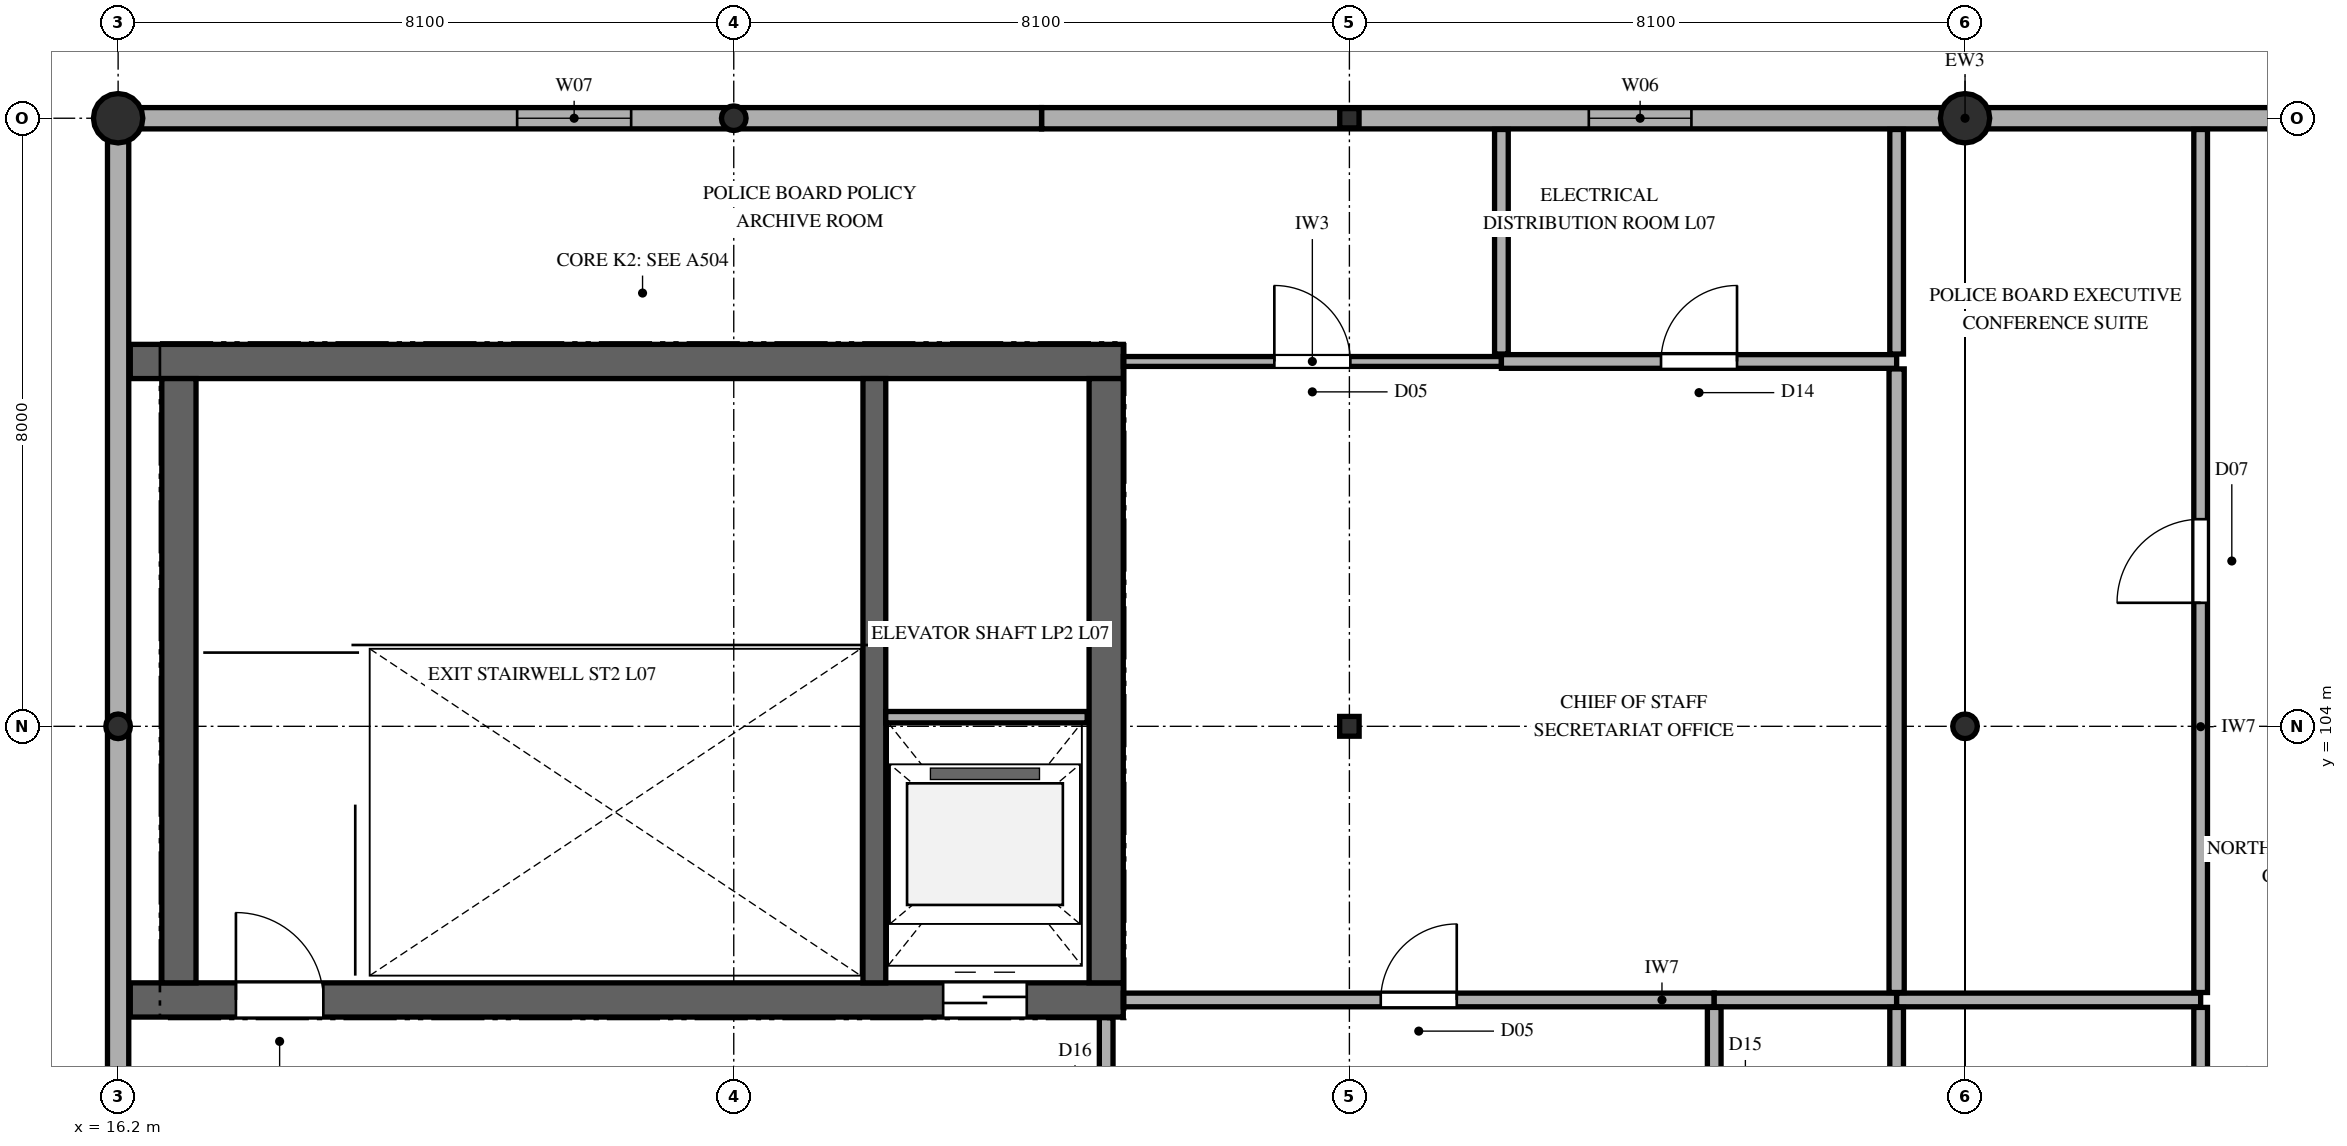
"""IFC4 building model, lengths in metres.
Left out: names, types, materials, properties, quantities, classifications, styles, units other than length and angle.
Written with IfcOpenShell. Run it as: python <this file> out.ifc"""

import sys

from ifc_helpers import new_model, si_unit, direction, frame, frame_2d, origin, origin_2d, place, context, subcontext, project, spatial, rectangle, hollow_rectangle, circle, hollow_circle, i_section, extrude, element, fill, save


model = new_model("IFC4")
c1 = context("Model", 3, precision=1e-05, world=origin(), true_north=direction((0.0, 1.0)))
c2 = subcontext(c1, "Body", "Model", "MODEL_VIEW")
j1 = project(units=[si_unit("LENGTHUNIT", "METRE"), si_unit("PLANEANGLEUNIT", "RADIAN")], contexts=[c1])
p1 = place(None, origin())
s1 = spatial("IfcSite", under=j1, at=p1, CompositionType="ELEMENT")
p2 = place(p1, origin())
s2 = spatial("IfcBuilding", under=s1, at=p2, CompositionType="ELEMENT")
p3 = place(p2, frame((0.0, 0.0, 33.3)))
s3 = spatial("IfcBuildingStorey", under=s2, at=p3, CompositionType="ELEMENT", Elevation=33.3)
p4 = place(p3, frame((16.36, 100.4, 0.0), z_axis=(0.0, 0.0, 1.0), x_axis=(1.0, 0.0, 0.0)))
e1 = element("IfcWall", 1, at=p4, inside=s3, PredefinedType="SHEAR", context=c2, shape_type="SweptSolid", body=[
    extrude(rectangle(XDim=13.065, YDim=0.45, at=frame_2d((6.532, 0.0))), origin(), (0.0, 0.0, 1.0), 3.98),
])
p5 = place(p4, frame((1.39, 0.0, 0.0)))
e2 = element("IfcOpeningElement", 2, at=p5, cuts=e1, PredefinedType="OPENING", context=c2, shape_type="SweptSolid", body=[
    extrude(rectangle(XDim=1.15, YDim=2.25, at=frame_2d((0.575, 1.125))), frame((0.0, 0.235, 0.0), z_axis=(0.0, -1.0, 0.0), x_axis=(1.0, 0.0, 0.0)), (0.0, 0.0, 1.0), 0.47),
])
p6 = place(p4, frame((10.695, 0.0, 0.0)))
e3 = element("IfcOpeningElement", 3, at=p6, cuts=e1, PredefinedType="OPENING", context=c2, shape_type="SweptSolid", body=[
    extrude(rectangle(XDim=1.1, YDim=2.2, at=frame_2d((0.55, 1.1))), frame((0.0, 0.235, 0.0), z_axis=(0.0, -1.0, 0.0), x_axis=(1.0, 0.0, 0.0)), (0.0, 0.0, 1.0), 0.47),
])
p7 = place(p3, frame((16.36, 108.8, 0.0), z_axis=(0.0, 0.0, 1.0), x_axis=(1.0, 0.0, 0.0)))
e4 = element("IfcWall", 4, at=p7, inside=s3, PredefinedType="SHEAR", context=c2, shape_type="SweptSolid", body=[
    extrude(rectangle(XDim=13.065, YDim=0.45, at=frame_2d((6.532, 0.0))), origin(), (0.0, 0.0, 1.0), 3.98),
])
for number, where, z_axis, x_axis in (
    (5, (17.0, 100.625, 0.0), (0.0, 0.0, 1.0), (0.0, 1.0, 0.0)),
    (6, (29.2, 100.625, 0.0), (0.0, 0.0, 1.0), (0.0, 1.0, 0.0)),
):
    element("IfcWall", number, at=place(p3, frame(where, z_axis=z_axis, x_axis=x_axis)), inside=s3, PredefinedType="SHEAR", context=c2, shape_type="SweptSolid", body=[
        extrude(rectangle(XDim=7.95, YDim=0.45, at=frame_2d((3.975, 0.0))), origin(), (0.0, 0.0, 1.0), 3.98),
    ])
p8 = place(p3, frame((26.15, 100.625, 0.0), z_axis=(0.0, 0.0, 1.0), x_axis=(0.0, 1.0, 0.0)))
e7 = element("IfcWall", 7, at=p8, inside=s3, PredefinedType="SHEAR", context=c2, shape_type="SweptSolid", body=[
    extrude(rectangle(XDim=7.95, YDim=0.3, at=frame_2d((3.975, 0.0))), origin(), (0.0, 0.0, 1.0), 3.98),
])
p9 = place(p3, frame((16.2, 104.0, 0.0), z_axis=(0.0, 0.0, 1.0), x_axis=(1.0, 0.0, 0.0)))
e8 = element("IfcColumn", 8, at=p9, inside=s3, PredefinedType="COLUMN", context=c2, shape_type="SweptSolid", body=[
    extrude(hollow_circle(Radius=0.162, WallThickness=0.013, at=origin_2d()), origin(), (0.0, 0.0, 1.0), 3.98),
])
p10 = place(p3, frame((16.2, 112.0, 0.0), z_axis=(0.0, 0.0, 1.0), x_axis=(1.0, 0.0, 0.0)))
e9 = element("IfcColumn", 9, at=p10, inside=s3, PredefinedType="COLUMN", context=c2, shape_type="SweptSolid", body=[
    extrude(circle(Radius=0.325, at=origin_2d()), origin(), (0.0, 0.0, 1.0), 3.98),
])
p11 = place(p3, frame((24.3, 112.0, 0.0), z_axis=(0.0, 0.0, 1.0), x_axis=(1.0, 0.0, 0.0)))
e10 = element("IfcColumn", 10, at=p11, inside=s3, PredefinedType="COLUMN", context=c2, shape_type="SweptSolid", body=[
    extrude(hollow_circle(Radius=0.162, WallThickness=0.013, at=origin_2d()), origin(), (0.0, 0.0, 1.0), 3.98),
])
p12 = place(p3, frame((32.4, 104.0, 0.0), z_axis=(0.0, 0.0, 1.0), x_axis=(1.0, 0.0, 0.0)))
e11 = element("IfcColumn", 11, at=p12, inside=s3, PredefinedType="COLUMN", context=c2, shape_type="SweptSolid", body=[
    extrude(i_section(OverallWidth=0.256, OverallDepth=0.26, WebThickness=0.011, FlangeThickness=0.017, FilletRadius=0.013, at=origin_2d()), origin(), (0.0, 0.0, 1.0), 3.98),
])
p13 = place(p3, frame((32.4, 112.0, 0.0), z_axis=(0.0, 0.0, 1.0), x_axis=(1.0, 0.0, 0.0)))
e12 = element("IfcColumn", 12, at=p13, inside=s3, PredefinedType="COLUMN", context=c2, shape_type="SweptSolid", body=[
    extrude(hollow_rectangle(XDim=0.254, YDim=0.254, WallThickness=0.013, InnerFilletRadius=0.013, OuterFilletRadius=0.025, at=origin_2d()), origin(), (0.0, 0.0, 1.0), 3.98),
])
p14 = place(p3, frame((40.5, 104.0, 0.0), z_axis=(0.0, 0.0, 1.0), x_axis=(1.0, 0.0, 0.0)))
e13 = element("IfcColumn", 13, at=p14, inside=s3, PredefinedType="COLUMN", context=c2, shape_type="SweptSolid", body=[
    extrude(hollow_circle(Radius=0.162, WallThickness=0.013, at=origin_2d()), origin(), (0.0, 0.0, 1.0), 3.98),
])
p15 = place(p3, frame((40.5, 112.0, 0.0), z_axis=(0.0, 0.0, 1.0), x_axis=(1.0, 0.0, 0.0)))
e14 = element("IfcColumn", 14, at=p15, inside=s3, PredefinedType="COLUMN", context=c2, shape_type="SweptSolid", body=[
    extrude(circle(Radius=0.325, at=origin_2d()), origin(), (0.0, 0.0, 1.0), 3.98),
])
p16 = place(p3, frame((52.65, 112.0, 0.0), z_axis=(0.0, 0.0, 1.0), x_axis=(-1.0, 0.0, 0.0)))
e15 = element("IfcWall", 15, at=p16, inside=s3, PredefinedType="SOLIDWALL", context=c2, shape_type="SweptSolid", body=[
    extrude(rectangle(XDim=12.15, YDim=0.28, at=frame_2d((6.075, 0.0))), origin(), (0.0, 0.0, 1.0), 3.655),
])
p17 = place(p3, frame((40.5, 112.0, 0.0), z_axis=(0.0, 0.0, 1.0), x_axis=(-1.0, 0.0, 0.0)))
e16 = element("IfcWall", 16, at=p17, inside=s3, PredefinedType="SOLIDWALL", context=c2, shape_type="SweptSolid", body=[
    extrude(rectangle(XDim=12.15, YDim=0.28, at=frame_2d((6.075, 0.0))), origin(), (0.0, 0.0, 1.0), 3.655),
])
p18 = place(p17, frame((3.6, 0.0, 0.85)))
e17 = element("IfcOpeningElement", 17, at=p18, cuts=e16, PredefinedType="OPENING", context=c2, shape_type="SweptSolid", body=[
    extrude(rectangle(XDim=1.35, YDim=2.1, at=frame_2d((0.675, 1.05))), frame((0.0, 0.15, 0.0), z_axis=(0.0, -1.0, 0.0), x_axis=(1.0, 0.0, 0.0)), (0.0, 0.0, 1.0), 0.3),
])
p19 = place(p3, frame((28.35, 112.0, 0.0), z_axis=(0.0, 0.0, 1.0), x_axis=(-1.0, 0.0, 0.0)))
e18 = element("IfcWall", 18, at=p19, inside=s3, PredefinedType="SOLIDWALL", context=c2, shape_type="SweptSolid", body=[
    extrude(rectangle(XDim=12.15, YDim=0.28, at=frame_2d((6.075, 0.0))), origin(), (0.0, 0.0, 1.0), 3.655),
])
p20 = place(p19, frame((5.4, 0.0, 0.95)))
e19 = element("IfcOpeningElement", 19, at=p20, cuts=e18, PredefinedType="OPENING", context=c2, shape_type="SweptSolid", body=[
    extrude(rectangle(XDim=1.5, YDim=1.8, at=frame_2d((0.75, 0.9))), frame((0.0, 0.15, 0.0), z_axis=(0.0, -1.0, 0.0), x_axis=(1.0, 0.0, 0.0)), (0.0, 0.0, 1.0), 0.3),
])
p21 = place(p3, frame((16.2, 112.0, 0.0), z_axis=(0.0, 0.0, 1.0), x_axis=(0.0, -1.0, 0.0)))
e20 = element("IfcWall", 20, at=p21, inside=s3, PredefinedType="SOLIDWALL", context=c2, shape_type="SweptSolid", body=[
    extrude(rectangle(XDim=14.0, YDim=0.28, at=frame_2d((7.0, 0.0))), origin(), (0.0, 0.0, 1.0), 3.655),
])
p22 = place(p3, frame((26.3, 104.12, 0.0), z_axis=(0.0, 0.0, 1.0), x_axis=(1.0, 0.0, 0.0)))
e21 = element("IfcWall", 21, at=p22, inside=s3, PredefinedType="PARTITIONING", context=c2, shape_type="SweptSolid", body=[
    extrude(rectangle(XDim=2.65, YDim=0.15, at=frame_2d((1.325, 0.0))), origin(), (0.0, 0.0, 1.0), 3.98),
])
p23 = place(p3, frame((29.425, 100.4, 0.0), z_axis=(0.0, 0.0, 1.0), x_axis=(1.0, 0.0, 0.0)))
e22 = element("IfcWall", 22, at=p23, inside=s3, PredefinedType="PARTITIONING", context=c2, shape_type="SweptSolid", body=[
    extrude(rectangle(XDim=7.775, YDim=0.18, at=frame_2d((3.887, 0.0))), origin(), (0.0, 0.0, 1.0), 3.98),
])
p24 = place(p23, frame((3.387, 0.0, 0.0)))
e23 = element("IfcOpeningElement", 23, at=p24, cuts=e22, PredefinedType="OPENING", context=c2, shape_type="SweptSolid", body=[
    extrude(rectangle(XDim=1.0, YDim=2.2, at=frame_2d((0.5, 1.1))), frame((0.0, 0.1, 0.0), z_axis=(0.0, -1.0, 0.0), x_axis=(1.0, 0.0, 0.0)), (0.0, 0.0, 1.0), 0.2),
])
p25 = place(p3, frame((29.425, 108.8, 0.0), z_axis=(0.0, 0.0, 1.0), x_axis=(1.0, 0.0, 0.0)))
e24 = element("IfcWall", 24, at=p25, inside=s3, PredefinedType="PARTITIONING", context=c2, shape_type="SweptSolid", body=[
    extrude(rectangle(XDim=4.975, YDim=0.13, at=frame_2d((2.487, 0.0))), origin(), (0.0, 0.0, 1.0), 3.98),
])
p26 = place(p25, frame((1.988, 0.0, 0.0)))
e25 = element("IfcOpeningElement", 25, at=p26, cuts=e24, PredefinedType="OPENING", context=c2, shape_type="SweptSolid", body=[
    extrude(rectangle(XDim=1.0, YDim=2.2, at=frame_2d((0.5, 1.1))), frame((0.0, 0.075, 0.0), z_axis=(0.0, -1.0, 0.0), x_axis=(1.0, 0.0, 0.0)), (0.0, 0.0, 1.0), 0.15),
])
p27 = place(p3, frame((34.4, 108.8, 0.0), z_axis=(0.0, 0.0, 1.0), x_axis=(1.0, 0.0, 0.0)))
e26 = element("IfcWall", 26, at=p27, inside=s3, PredefinedType="PARTITIONING", context=c2, shape_type="SweptSolid", body=[
    extrude(rectangle(XDim=5.2, YDim=0.18, at=frame_2d((2.6, 0.0))), origin(), (0.0, 0.0, 1.0), 3.98),
])
p28 = place(p27, frame((2.1, 0.0, 0.0)))
e27 = element("IfcOpeningElement", 27, at=p28, cuts=e26, PredefinedType="OPENING", context=c2, shape_type="SweptSolid", body=[
    extrude(rectangle(XDim=1.0, YDim=2.15, at=frame_2d((0.5, 1.075))), frame((0.0, 0.1, 0.0), z_axis=(0.0, -1.0, 0.0), x_axis=(1.0, 0.0, 0.0)), (0.0, 0.0, 1.0), 0.2),
])
p29 = place(p3, frame((37.2, 100.4, 0.0), z_axis=(0.0, 0.0, 1.0), x_axis=(1.0, 0.0, 0.0)))
e28 = element("IfcWall", 28, at=p29, inside=s3, PredefinedType="PARTITIONING", context=c2, shape_type="SweptSolid", body=[
    extrude(rectangle(XDim=2.4, YDim=0.18, at=frame_2d((1.2, 0.0))), origin(), (0.0, 0.0, 1.0), 3.98),
])
p30 = place(p3, frame((39.6, 100.4, 0.0), z_axis=(0.0, 0.0, 1.0), x_axis=(1.0, 0.0, 0.0)))
e29 = element("IfcWall", 29, at=p30, inside=s3, PredefinedType="PARTITIONING", context=c2, shape_type="SweptSolid", body=[
    extrude(rectangle(XDim=4.0, YDim=0.18, at=frame_2d((2.0, 0.0))), origin(), (0.0, 0.0, 1.0), 3.98),
])
p31 = place(p3, frame((29.2, 96.898, 0.0), z_axis=(0.0, 0.0, 1.0), x_axis=(0.0, 1.0, 0.0)))
e30 = element("IfcWall", 30, at=p31, inside=s3, PredefinedType="PARTITIONING", context=c2, shape_type="SweptSolid", body=[
    extrude(rectangle(XDim=3.269, YDim=0.18, at=frame_2d((1.635, 0.0))), origin(), (0.0, 0.0, 1.0), 3.98),
])
p32 = place(p31, frame((1.034, 0.0, 0.0)))
e31 = element("IfcOpeningElement", 31, at=p32, cuts=e30, PredefinedType="OPENING", context=c2, shape_type="SweptSolid", body=[
    extrude(rectangle(XDim=1.2, YDim=2.2, at=frame_2d((0.6, 1.1))), frame((0.0, 0.1, 0.0), z_axis=(0.0, -1.0, 0.0), x_axis=(1.0, 0.0, 0.0)), (0.0, 0.0, 1.0), 0.2),
])
p33 = place(p3, frame((34.4, 108.898, 0.0), z_axis=(0.0, 0.0, 1.0), x_axis=(0.0, 1.0, 0.0)))
e32 = element("IfcWall", 32, at=p33, inside=s3, PredefinedType="PARTITIONING", context=c2, shape_type="SweptSolid", body=[
    extrude(rectangle(XDim=2.954, YDim=0.18, at=frame_2d((1.477, 0.0))), origin(), (0.0, 0.0, 1.0), 3.98),
])
p34 = place(p3, frame((37.2, 96.898, 0.0), z_axis=(0.0, 0.0, 1.0), x_axis=(0.0, 1.0, 0.0)))
e33 = element("IfcWall", 33, at=p34, inside=s3, PredefinedType="PARTITIONING", context=c2, shape_type="SweptSolid", body=[
    extrude(rectangle(XDim=3.404, YDim=0.18, at=frame_2d((1.702, 0.0))), origin(), (0.0, 0.0, 1.0), 3.98),
])
p35 = place(p34, frame((1.152, 0.0, 0.0)))
e34 = element("IfcOpeningElement", 34, at=p35, cuts=e33, PredefinedType="OPENING", context=c2, shape_type="SweptSolid", body=[
    extrude(rectangle(XDim=1.1, YDim=2.2, at=frame_2d((0.55, 1.1))), frame((0.0, 0.1, 0.0), z_axis=(0.0, -1.0, 0.0), x_axis=(1.0, 0.0, 0.0)), (0.0, 0.0, 1.0), 0.2),
])
p36 = place(p3, frame((39.6, 96.098, 0.0), z_axis=(0.0, 0.0, 1.0), x_axis=(0.0, 1.0, 0.0)))
e35 = element("IfcWall", 35, at=p36, inside=s3, PredefinedType="PARTITIONING", context=c2, shape_type="SweptSolid", body=[
    extrude(rectangle(XDim=4.204, YDim=0.18, at=frame_2d((2.102, 0.0))), origin(), (0.0, 0.0, 1.0), 3.98),
])
p37 = place(p36, frame((1.552, 0.0, 0.0)))
e36 = element("IfcOpeningElement", 36, at=p37, cuts=e35, PredefinedType="OPENING", context=c2, shape_type="SweptSolid", body=[
    extrude(rectangle(XDim=1.1, YDim=2.2, at=frame_2d((0.55, 1.1))), frame((0.0, 0.1, 0.0), z_axis=(0.0, -1.0, 0.0), x_axis=(1.0, 0.0, 0.0)), (0.0, 0.0, 1.0), 0.2),
])
p38 = place(p3, frame((39.6, 100.498, 0.0), z_axis=(0.0, 0.0, 1.0), x_axis=(0.0, 1.0, 0.0)))
e37 = element("IfcWall", 37, at=p38, inside=s3, PredefinedType="PARTITIONING", context=c2, shape_type="SweptSolid", body=[
    extrude(rectangle(XDim=8.204, YDim=0.2, at=frame_2d((4.102, 0.0))), origin(), (0.0, 0.0, 1.0), 3.98),
])
p39 = place(p3, frame((39.6, 108.898, 0.0), z_axis=(0.0, 0.0, 1.0), x_axis=(0.0, 1.0, 0.0)))
e38 = element("IfcWall", 38, at=p39, inside=s3, PredefinedType="PARTITIONING", context=c2, shape_type="SweptSolid", body=[
    extrude(rectangle(XDim=2.954, YDim=0.18, at=frame_2d((1.477, 0.0))), origin(), (0.0, 0.0, 1.0), 3.98),
])
p40 = place(p3, frame((43.6, 96.138, 0.0), z_axis=(0.0, 0.0, 1.0), x_axis=(0.0, 1.0, 0.0)))
e39 = element("IfcWall", 39, at=p40, inside=s3, PredefinedType="PARTITIONING", context=c2, shape_type="SweptSolid", body=[
    extrude(rectangle(XDim=4.164, YDim=0.18, at=frame_2d((2.082, 0.0))), origin(), (0.0, 0.0, 1.0), 3.98),
])
p41 = place(p40, frame((1.532, 0.0, 0.0)))
e40 = element("IfcOpeningElement", 40, at=p41, cuts=e39, PredefinedType="OPENING", context=c2, shape_type="SweptSolid", body=[
    extrude(rectangle(XDim=1.1, YDim=2.2, at=frame_2d((0.55, 1.1))), frame((0.0, 0.1, 0.0), z_axis=(0.0, -1.0, 0.0), x_axis=(1.0, 0.0, 0.0)), (0.0, 0.0, 1.0), 0.2),
])
p42 = place(p3, frame((43.6, 100.498, 0.0), z_axis=(0.0, 0.0, 1.0), x_axis=(0.0, 1.0, 0.0)))
e41 = element("IfcWall", 41, at=p42, inside=s3, PredefinedType="PARTITIONING", context=c2, shape_type="SweptSolid", body=[
    extrude(rectangle(XDim=11.354, YDim=0.18, at=frame_2d((5.677, 0.0))), origin(), (0.0, 0.0, 1.0), 3.98),
])
p43 = place(p42, frame((5.127, 0.0, 0.0)))
e42 = element("IfcOpeningElement", 42, at=p43, cuts=e41, PredefinedType="OPENING", context=c2, shape_type="SweptSolid", body=[
    extrude(rectangle(XDim=1.1, YDim=2.2, at=frame_2d((0.55, 1.1))), frame((0.0, 0.1, 0.0), z_axis=(0.0, -1.0, 0.0), x_axis=(1.0, 0.0, 0.0)), (0.0, 0.0, 1.0), 0.2),
])
p44 = place(p18, origin())
e43 = element("IfcWindow", 43, at=p44, inside=s3, PartitioningType="DOUBLE_PANEL_VERTICAL", PredefinedType="WINDOW", context=c2, shape_type="SweptSolid", body=[
    extrude(rectangle(XDim=1.35, YDim=2.1, at=frame_2d((0.675, 1.05))), frame((0.0, 0.03, 0.0), z_axis=(0.0, -1.0, 0.0), x_axis=(1.0, 0.0, 0.0)), (0.0, 0.0, 1.0), 0.06),
])
fill(e17, e43)
p45 = place(p20, origin())
e44 = element("IfcWindow", 44, at=p45, inside=s3, PartitioningType="DOUBLE_PANEL_VERTICAL", PredefinedType="WINDOW", context=c2, shape_type="SweptSolid", body=[
    extrude(rectangle(XDim=1.5, YDim=1.8, at=frame_2d((0.75, 0.9))), frame((0.0, 0.03, 0.0), z_axis=(0.0, -1.0, 0.0), x_axis=(1.0, 0.0, 0.0)), (0.0, 0.0, 1.0), 0.06),
])
fill(e19, e44)
p46 = place(p5, origin())
e45 = element("IfcDoor", 45, at=p46, inside=s3, OperationType="SINGLE_SWING_LEFT", PredefinedType="DOOR", context=c2, shape_type="SweptSolid", body=[
    extrude(rectangle(XDim=1.15, YDim=2.25, at=frame_2d((0.575, 1.125))), frame((0.0, 0.025, 0.0), z_axis=(0.0, -1.0, 0.0), x_axis=(1.0, 0.0, 0.0)), (0.0, 0.0, 1.0), 0.05),
])
fill(e2, e45)
p47 = place(p6, frame((1.1, 0.0, 0.0), z_axis=(0.0, 0.0, 1.0), x_axis=(-1.0, 0.0, 0.0)))
e46 = element("IfcDoor", 46, at=p47, inside=s3, OperationType="DOUBLE_DOOR_SLIDING", PredefinedType="DOOR", context=c2, shape_type="SweptSolid", body=[
    extrude(rectangle(XDim=1.1, YDim=2.2, at=frame_2d((0.55, 1.1))), frame((0.0, 0.025, 0.0), z_axis=(0.0, -1.0, 0.0), x_axis=(1.0, 0.0, 0.0)), (0.0, 0.0, 1.0), 0.05),
])
fill(e3, e46)
p48 = place(p24, origin())
e47 = element("IfcDoor", 47, at=p48, inside=s3, OperationType="SINGLE_SWING_RIGHT", PredefinedType="DOOR", context=c2, shape_type="SweptSolid", body=[
    extrude(rectangle(XDim=1.0, YDim=2.2, at=frame_2d((0.5, 1.1))), frame((0.0, 0.025, 0.0), z_axis=(0.0, -1.0, 0.0), x_axis=(1.0, 0.0, 0.0)), (0.0, 0.0, 1.0), 0.05),
])
fill(e23, e47)
p49 = place(p26, origin())
e48 = element("IfcDoor", 48, at=p49, inside=s3, OperationType="SINGLE_SWING_LEFT", PredefinedType="DOOR", context=c2, shape_type="SweptSolid", body=[
    extrude(rectangle(XDim=1.0, YDim=2.2, at=frame_2d((0.5, 1.1))), frame((0.0, 0.025, 0.0), z_axis=(0.0, -1.0, 0.0), x_axis=(1.0, 0.0, 0.0)), (0.0, 0.0, 1.0), 0.05),
])
fill(e25, e48)
p50 = place(p28, origin())
e49 = element("IfcDoor", 49, at=p50, inside=s3, OperationType="SINGLE_SWING_RIGHT", PredefinedType="DOOR", context=c2, shape_type="SweptSolid", body=[
    extrude(rectangle(XDim=1.0, YDim=2.15, at=frame_2d((0.5, 1.075))), frame((0.0, 0.025, 0.0), z_axis=(0.0, -1.0, 0.0), x_axis=(1.0, 0.0, 0.0)), (0.0, 0.0, 1.0), 0.05),
])
fill(e27, e49)
p51 = place(p43, origin())
e50 = element("IfcDoor", 50, at=p51, inside=s3, OperationType="SINGLE_SWING_LEFT", PredefinedType="DOOR", context=c2, shape_type="SweptSolid", body=[
    extrude(rectangle(XDim=1.1, YDim=2.2, at=frame_2d((0.55, 1.1))), frame((0.0, 0.025, 0.0), z_axis=(0.0, -1.0, 0.0), x_axis=(1.0, 0.0, 0.0)), (0.0, 0.0, 1.0), 0.05),
])
fill(e42, e50)
save(model, sys.argv[1])
